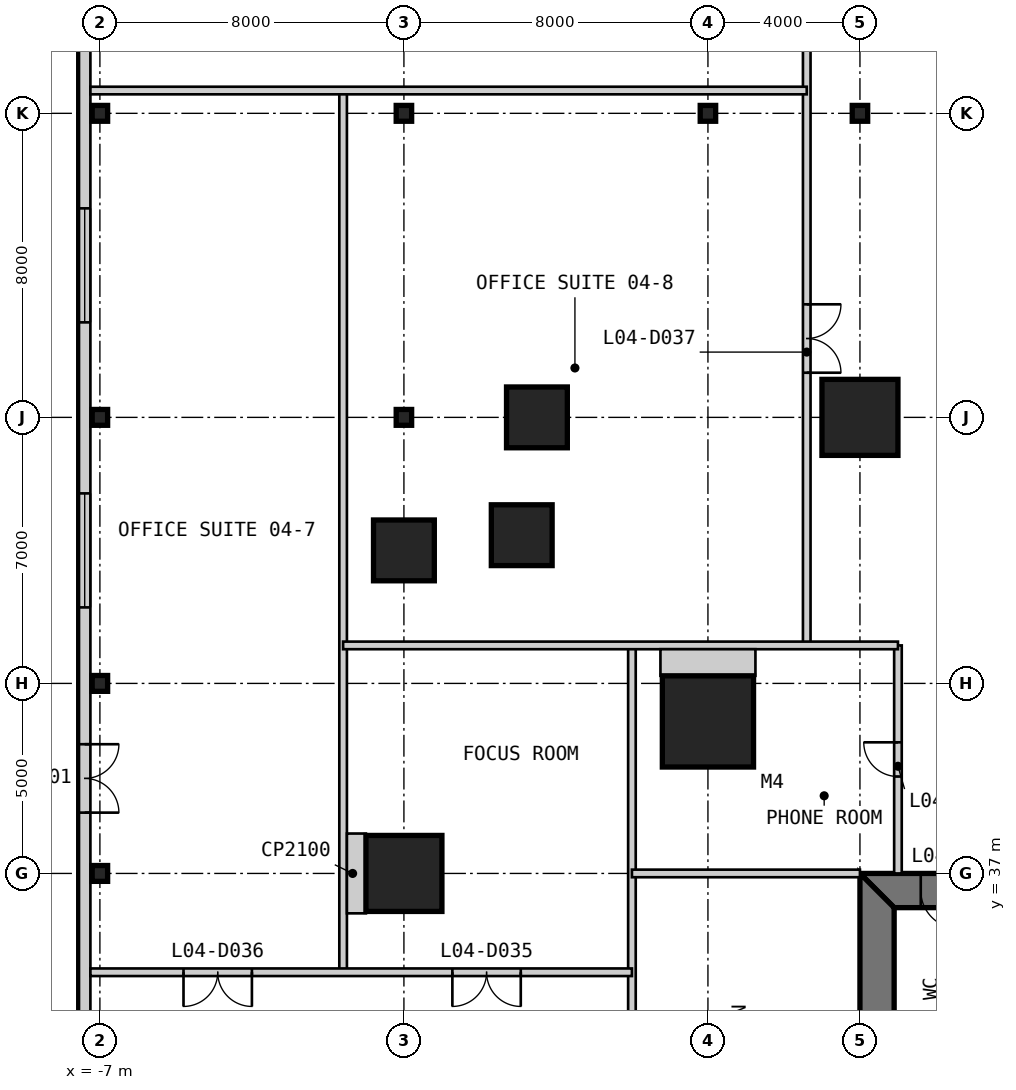
"""IFC4 building model, lengths in metres.
Left out: names, types, materials, properties, quantities, classifications, styles, units other than length and angle.
Written with IfcOpenShell. Run it as: python <this file> out.ifc"""

import sys

from ifc_helpers import new_model, si_unit, direction, frame, frame_2d, origin, origin_2d, place, context, subcontext, project, spatial, polyline, rectangle, i_section, outline, extrude, element, fill, save


model = new_model("IFC4")
c1 = context("Model", 3, precision=1e-05, world=origin(), true_north=direction((0.0, 1.0)))
c2 = subcontext(c1, "Body", "Model", "MODEL_VIEW")
j1 = project(units=[si_unit("LENGTHUNIT", "METRE"), si_unit("PLANEANGLEUNIT", "RADIAN")], contexts=[c1])
p1 = place(None, origin())
s1 = spatial("IfcSite", under=j1, at=p1, CompositionType="ELEMENT")
p2 = place(p1, origin())
s2 = spatial("IfcBuilding", under=s1, at=p2, CompositionType="ELEMENT")
p3 = place(p2, frame((0.0, 0.0, 21.4)))
s3 = spatial("IfcBuildingStorey", under=s2, at=p3, CompositionType="ELEMENT", Elevation=21.4)
p4 = place(p3, frame((9.0, 41.0, 0.0), z_axis=(0.0, 0.0, 1.0), x_axis=(1.0, 0.0, 0.0)))
e1 = element("IfcColumn", 1, at=p4, inside=s3, PredefinedType="COLUMN", context=c2, shape_type="SweptSolid", body=[
    extrude(rectangle(XDim=2.4, YDim=2.4, at=origin_2d()), origin(), (0.0, 0.0, 1.0), 4.8),
])
p5 = place(p3, frame((13.0, 49.0, 0.0), z_axis=(0.0, 0.0, 1.0), x_axis=(1.0, 0.0, 0.0)))
e2 = element("IfcColumn", 2, at=p5, inside=s3, PredefinedType="COLUMN", context=c2, shape_type="SweptSolid", body=[
    extrude(rectangle(XDim=2.0, YDim=2.0, at=origin_2d()), origin(), (0.0, 0.0, 1.0), 4.8),
])
for number, where, z_axis, x_axis in (
    (3, (4.5, 49.0, 0.0), (0.0, 0.0, 1.0), (1.0, 0.0, 0.0)),
    (4, (4.1, 45.9, 0.0), (0.0, 0.0, 1.0), (1.0, 0.0, 0.0)),
    (5, (1.0, 45.5, 0.0), (0.0, 0.0, 1.0), (1.0, 0.0, 0.0)),
):
    element("IfcColumn", number, at=place(p3, frame(where, z_axis=z_axis, x_axis=x_axis)), inside=s3, PredefinedType="COLUMN", context=c2, shape_type="SweptSolid", body=[
        extrude(rectangle(XDim=1.6, YDim=1.6, at=origin_2d()), origin(), (0.0, 0.0, 1.0), 4.8),
    ])
p6 = place(p3, frame((1.0, 37.0, 0.0), z_axis=(0.0, 0.0, 1.0), x_axis=(1.0, 0.0, 0.0)))
e6 = element("IfcColumn", 6, at=p6, inside=s3, PredefinedType="COLUMN", context=c2, shape_type="SweptSolid", body=[
    extrude(rectangle(XDim=2.0, YDim=2.0, at=origin_2d()), origin(), (0.0, 0.0, 1.0), 4.8),
])
for number, where, z_axis, x_axis in (
    (7, (-7.0, 37.0, 0.0), (0.0, 0.0, 1.0), (1.0, 0.0, 0.0)),
    (8, (-7.0, 42.0, 0.0), (0.0, 0.0, 1.0), (1.0, 0.0, 0.0)),
    (9, (-7.0, 49.0, 0.0), (0.0, 0.0, 1.0), (1.0, 0.0, 0.0)),
    (10, (-7.0, 57.0, 0.0), (0.0, 0.0, 1.0), (1.0, 0.0, 0.0)),
    (11, (1.0, 49.0, 0.0), (0.0, 0.0, 1.0), (1.0, 0.0, 0.0)),
    (12, (1.0, 57.0, 0.0), (0.0, 0.0, 1.0), (1.0, 0.0, 0.0)),
    (13, (9.0, 57.0, 0.0), (0.0, 0.0, 1.0), (1.0, 0.0, 0.0)),
    (14, (13.0, 57.0, 0.0), (0.0, 0.0, 1.0), (1.0, 0.0, 0.0)),
):
    element("IfcColumn", number, at=place(p3, frame(where, z_axis=z_axis, x_axis=x_axis)), inside=s3, PredefinedType="COLUMN", context=c2, shape_type="SweptSolid", body=[
        extrude(i_section(OverallWidth=0.406, OverallDepth=0.417, WebThickness=0.03, FlangeThickness=0.048, at=origin_2d()), origin(), (0.0, 0.0, 1.0), 4.8),
    ])
p7 = place(p3, frame((37.0, 36.55, 0.0), z_axis=(0.0, 0.0, 1.0), x_axis=(-1.0, 0.0, 0.0)))
e15 = element("IfcWall", 15, at=p7, inside=s3, PredefinedType="SHEAR", context=c2, shape_type="SweptSolid", body=[
    extrude(outline(polyline([(0.0, -0.45), (24.0, -0.45), (23.1, 0.45), (0.9, 0.45), (0.0, -0.45)])), origin(), (0.0, 0.0, 1.0), 4.8),
])
p8 = place(p7, frame((4.9, 0.0, 0.0)))
e16 = element("IfcOpeningElement", 16, at=p8, cuts=e15, PredefinedType="OPENING", context=c2, shape_type="SweptSolid", body=[
    extrude(rectangle(XDim=1.0, YDim=2.2, at=frame_2d((0.5, 1.1))), frame((0.0, 0.46, 0.0), z_axis=(0.0, -1.0, 0.0), x_axis=(1.0, 0.0, 0.0)), (0.0, 0.0, 1.0), 0.92),
])
p9 = place(p7, frame((8.9, 0.0, 0.0)))
e17 = element("IfcOpeningElement", 17, at=p9, cuts=e15, PredefinedType="OPENING", context=c2, shape_type="SweptSolid", body=[
    extrude(rectangle(XDim=1.1, YDim=2.2, at=frame_2d((0.55, 1.1))), frame((0.0, 0.46, 0.0), z_axis=(0.0, -1.0, 0.0), x_axis=(1.0, 0.0, 0.0)), (0.0, 0.0, 1.0), 0.92),
])
p10 = place(p7, frame((15.05, 0.0, 0.0)))
e18 = element("IfcOpeningElement", 18, at=p10, cuts=e15, PredefinedType="OPENING", context=c2, shape_type="SweptSolid", body=[
    extrude(rectangle(XDim=0.9, YDim=2.2, at=frame_2d((0.45, 1.1))), frame((0.0, 0.46, 0.0), z_axis=(0.0, -1.0, 0.0), x_axis=(1.0, 0.0, 0.0)), (0.0, 0.0, 1.0), 0.92),
])
p11 = place(p7, frame((17.9, 0.0, 0.0)))
e19 = element("IfcOpeningElement", 19, at=p11, cuts=e15, PredefinedType="OPENING", context=c2, shape_type="SweptSolid", body=[
    extrude(rectangle(XDim=1.0, YDim=2.2, at=frame_2d((0.5, 1.1))), frame((0.0, 0.46, 0.0), z_axis=(0.0, -1.0, 0.0), x_axis=(1.0, 0.0, 0.0)), (0.0, 0.0, 1.0), 0.92),
])
p12 = place(p7, frame((21.4, 0.0, 0.0)))
e20 = element("IfcOpeningElement", 20, at=p12, cuts=e15, PredefinedType="OPENING", context=c2, shape_type="SweptSolid", body=[
    extrude(rectangle(XDim=1.0, YDim=2.2, at=frame_2d((0.5, 1.1))), frame((0.0, 0.46, 0.0), z_axis=(0.0, -1.0, 0.0), x_axis=(1.0, 0.0, 0.0)), (0.0, 0.0, 1.0), 0.92),
])
p13 = place(p3, frame((13.45, 36.1, 0.0), z_axis=(0.0, 0.0, 1.0), x_axis=(0.0, -1.0, 0.0)))
e21 = element("IfcWall", 21, at=p13, inside=s3, PredefinedType="SHEAR", context=c2, shape_type="SweptSolid", body=[
    extrude(outline(polyline([(-0.9, -0.45), (23.1, -0.45), (22.2, 0.45), (0.0, 0.45), (-0.9, -0.45)])), origin(), (0.0, 0.0, 1.0), 4.8),
])
p14 = place(p13, frame((20.2, 0.0, 0.0)))
e22 = element("IfcOpeningElement", 22, at=p14, cuts=e21, PredefinedType="OPENING", context=c2, shape_type="SweptSolid", body=[
    extrude(rectangle(XDim=1.0, YDim=2.2, at=frame_2d((0.5, 1.1))), frame((0.0, 0.46, 0.0), z_axis=(0.0, -1.0, 0.0), x_axis=(1.0, 0.0, 0.0)), (0.0, 0.0, 1.0), 0.92),
])
p15 = place(p13, frame((17.25, 0.0, 0.0)))
e23 = element("IfcOpeningElement", 23, at=p15, cuts=e21, PredefinedType="OPENING", context=c2, shape_type="SweptSolid", body=[
    extrude(rectangle(XDim=0.9, YDim=2.2, at=frame_2d((0.45, 1.1))), frame((0.0, 0.46, 0.0), z_axis=(0.0, -1.0, 0.0), x_axis=(1.0, 0.0, 0.0)), (0.0, 0.0, 1.0), 0.92),
])
p16 = place(p3, frame((-7.4, 65.25, 0.0), z_axis=(0.0, 0.0, 1.0), x_axis=(0.0, -1.0, 0.0)))
e24 = element("IfcWall", 24, at=p16, inside=s3, PredefinedType="SOLIDWALL", context=c2, shape_type="SweptSolid", body=[
    extrude(rectangle(XDim=72.5, YDim=0.3, at=frame_2d((36.25, 0.0))), origin(), (0.0, 0.0, 1.0), 4.5),
])
p17 = place(p16, frame((24.85, 0.0, 0.0)))
e25 = element("IfcOpeningElement", 25, at=p17, cuts=e24, PredefinedType="OPENING", context=c2, shape_type="SweptSolid", body=[
    extrude(rectangle(XDim=1.8, YDim=2.4, at=frame_2d((0.9, 1.2))), frame((0.0, 0.16, 0.0), z_axis=(0.0, -1.0, 0.0), x_axis=(1.0, 0.0, 0.0)), (0.0, 0.0, 1.0), 0.32),
])
p18 = place(p16, frame((59.85, 0.0, 0.0)))
e26 = element("IfcOpeningElement", 26, at=p18, cuts=e24, PredefinedType="OPENING", context=c2, shape_type="SweptSolid", body=[
    extrude(rectangle(XDim=1.8, YDim=2.4, at=frame_2d((0.9, 1.2))), frame((0.0, 0.16, 0.0), z_axis=(0.0, -1.0, 0.0), x_axis=(1.0, 0.0, 0.0)), (0.0, 0.0, 1.0), 0.32),
])
p19 = place(p16, frame((66.75, 0.0, 0.9)))
e27 = element("IfcOpeningElement", 27, at=p19, cuts=e24, PredefinedType="OPENING", context=c2, shape_type="SweptSolid", body=[
    extrude(rectangle(XDim=3.0, YDim=2.4, at=frame_2d((1.5, 1.2))), frame((0.0, 0.16, 0.0), z_axis=(0.0, -1.0, 0.0), x_axis=(1.0, 0.0, 0.0)), (0.0, 0.0, 1.0), 0.32),
])
p20 = place(p16, frame((44.75, 0.0, 0.9)))
e28 = element("IfcOpeningElement", 28, at=p20, cuts=e24, PredefinedType="OPENING", context=c2, shape_type="SweptSolid", body=[
    extrude(rectangle(XDim=3.0, YDim=2.4, at=frame_2d((1.5, 1.2))), frame((0.0, 0.16, 0.0), z_axis=(0.0, -1.0, 0.0), x_axis=(1.0, 0.0, 0.0)), (0.0, 0.0, 1.0), 0.32),
])
p21 = place(p16, frame((32.75, 0.0, 0.9)))
e29 = element("IfcOpeningElement", 29, at=p21, cuts=e24, PredefinedType="OPENING", context=c2, shape_type="SweptSolid", body=[
    extrude(rectangle(XDim=3.0, YDim=2.4, at=frame_2d((1.5, 1.2))), frame((0.0, 0.16, 0.0), z_axis=(0.0, -1.0, 0.0), x_axis=(1.0, 0.0, 0.0)), (0.0, 0.0, 1.0), 0.32),
])
p22 = place(p16, frame((18.25, 0.0, 0.9)))
e30 = element("IfcOpeningElement", 30, at=p22, cuts=e24, PredefinedType="OPENING", context=c2, shape_type="SweptSolid", body=[
    extrude(rectangle(XDim=3.0, YDim=2.4, at=frame_2d((1.5, 1.2))), frame((0.0, 0.16, 0.0), z_axis=(0.0, -1.0, 0.0), x_axis=(1.0, 0.0, 0.0)), (0.0, 0.0, 1.0), 0.32),
])
p23 = place(p16, frame((10.75, 0.0, 0.9)))
e31 = element("IfcOpeningElement", 31, at=p23, cuts=e24, PredefinedType="OPENING", context=c2, shape_type="SweptSolid", body=[
    extrude(rectangle(XDim=3.0, YDim=2.4, at=frame_2d((1.5, 1.2))), frame((0.0, 0.16, 0.0), z_axis=(0.0, -1.0, 0.0), x_axis=(1.0, 0.0, 0.0)), (0.0, 0.0, 1.0), 0.32),
])
p24 = place(p16, frame((2.75, 0.0, 0.9)))
e32 = element("IfcOpeningElement", 32, at=p24, cuts=e24, PredefinedType="OPENING", context=c2, shape_type="SweptSolid", body=[
    extrude(rectangle(XDim=3.0, YDim=2.4, at=frame_2d((1.5, 1.2))), frame((0.0, 0.16, 0.0), z_axis=(0.0, -1.0, 0.0), x_axis=(1.0, 0.0, 0.0)), (0.0, 0.0, 1.0), 0.32),
])
p25 = place(p3, frame((-0.6, 34.4, 0.0), z_axis=(0.0, 0.0, 1.0), x_axis=(0.0, 1.0, 0.0)))
e33 = element("IfcWall", 33, at=p25, inside=s3, PredefinedType="PARTITIONING", context=c2, shape_type="SweptSolid", body=[
    extrude(rectangle(XDim=23.2, YDim=0.2, at=frame_2d((11.6, 0.0))), origin(), (0.0, 0.0, 1.0), 4.5),
])
p26 = place(p3, frame((7.0, 15.0, 0.0), z_axis=(0.0, 0.0, 1.0), x_axis=(0.0, 1.0, 0.0)))
e34 = element("IfcWall", 34, at=p26, inside=s3, PredefinedType="PARTITIONING", context=c2, shape_type="SweptSolid", body=[
    extrude(rectangle(XDim=28.0, YDim=0.2, at=frame_2d((14.0, 0.0))), origin(), (0.0, 0.0, 1.0), 3.843),
])
p27 = place(p3, frame((11.6, 43.0, 0.0), z_axis=(0.0, 0.0, 1.0), x_axis=(0.0, 1.0, 0.0)))
e35 = element("IfcWall", 35, at=p27, inside=s3, PredefinedType="PARTITIONING", context=c2, shape_type="SweptSolid", body=[
    extrude(rectangle(XDim=22.25, YDim=0.2, at=frame_2d((11.125, 0.0))), origin(), (0.0, 0.0, 1.0), 4.5),
])
p28 = place(p27, frame((7.175, 0.0, 0.0)))
e36 = element("IfcOpeningElement", 36, at=p28, cuts=e35, PredefinedType="OPENING", context=c2, shape_type="SweptSolid", body=[
    extrude(rectangle(XDim=1.8, YDim=2.4, at=frame_2d((0.9, 1.2))), frame((0.0, 0.11, 0.0), z_axis=(0.0, -1.0, 0.0), x_axis=(1.0, 0.0, 0.0)), (0.0, 0.0, 1.0), 0.22),
])
p29 = place(p27, frame((17.5, 0.0, 0.0)))
e37 = element("IfcOpeningElement", 37, at=p29, cuts=e35, PredefinedType="OPENING", context=c2, shape_type="SweptSolid", body=[
    extrude(rectangle(XDim=1.8, YDim=2.4, at=frame_2d((0.9, 1.2))), frame((0.0, 0.11, 0.0), z_axis=(0.0, -1.0, 0.0), x_axis=(1.0, 0.0, 0.0)), (0.0, 0.0, 1.0), 0.22),
])
p30 = place(p3, frame((14.0, 37.0, 0.0), z_axis=(0.0, 0.0, 1.0), x_axis=(0.0, 1.0, 0.0)))
e38 = element("IfcWall", 38, at=p30, inside=s3, PredefinedType="PARTITIONING", context=c2, shape_type="SweptSolid", body=[
    extrude(rectangle(XDim=6.0, YDim=0.2, at=frame_2d((3.0, 0.0))), origin(), (0.0, 0.0, 1.0), 4.5),
])
p31 = place(p30, frame((2.55, 0.0, 0.0)))
e39 = element("IfcOpeningElement", 39, at=p31, cuts=e38, PredefinedType="OPENING", context=c2, shape_type="SweptSolid", body=[
    extrude(rectangle(XDim=0.9, YDim=2.2, at=frame_2d((0.45, 1.1))), frame((0.0, 0.11, 0.0), z_axis=(0.0, -1.0, 0.0), x_axis=(1.0, 0.0, 0.0)), (0.0, 0.0, 1.0), 0.22),
])
p32 = place(p3, frame((-7.25, 34.4, 0.0), z_axis=(0.0, 0.0, 1.0), x_axis=(1.0, 0.0, 0.0)))
e40 = element("IfcWall", 40, at=p32, inside=s3, PredefinedType="PARTITIONING", context=c2, shape_type="SweptSolid", body=[
    extrude(rectangle(XDim=14.25, YDim=0.2, at=frame_2d((7.125, 0.0))), origin(), (0.0, 0.0, 1.0), 4.5),
])
p33 = place(p32, frame((9.525, 0.0, 0.0)))
e41 = element("IfcOpeningElement", 41, at=p33, cuts=e40, PredefinedType="OPENING", context=c2, shape_type="SweptSolid", body=[
    extrude(rectangle(XDim=1.8, YDim=2.4, at=frame_2d((0.9, 1.2))), frame((0.0, 0.11, 0.0), z_axis=(0.0, -1.0, 0.0), x_axis=(1.0, 0.0, 0.0)), (0.0, 0.0, 1.0), 0.22),
])
p34 = place(p32, frame((2.45, 0.0, 0.0)))
e42 = element("IfcOpeningElement", 42, at=p34, cuts=e40, PredefinedType="OPENING", context=c2, shape_type="SweptSolid", body=[
    extrude(rectangle(XDim=1.8, YDim=2.4, at=frame_2d((0.9, 1.2))), frame((0.0, 0.11, 0.0), z_axis=(0.0, -1.0, 0.0), x_axis=(1.0, 0.0, 0.0)), (0.0, 0.0, 1.0), 0.22),
])
p35 = place(p3, frame((7.0, 37.0, 0.0), z_axis=(0.0, 0.0, 1.0), x_axis=(1.0, 0.0, 0.0)))
e43 = element("IfcWall", 43, at=p35, inside=s3, PredefinedType="PARTITIONING", context=c2, shape_type="SweptSolid", body=[
    extrude(rectangle(XDim=6.0, YDim=0.2, at=frame_2d((3.0, 0.0))), origin(), (0.0, 0.0, 1.0), 3.653),
])
p36 = place(p3, frame((-0.6, 43.0, 0.0), z_axis=(0.0, 0.0, 1.0), x_axis=(1.0, 0.0, 0.0)))
e44 = element("IfcWall", 44, at=p36, inside=s3, PredefinedType="PARTITIONING", context=c2, shape_type="SweptSolid", body=[
    extrude(rectangle(XDim=14.6, YDim=0.2, at=frame_2d((7.3, 0.0))), origin(), (0.0, 0.0, 1.0), 4.5),
])
p37 = place(p3, frame((-7.25, 57.6, 0.0), z_axis=(0.0, 0.0, 1.0), x_axis=(1.0, 0.0, 0.0)))
e45 = element("IfcWall", 45, at=p37, inside=s3, PredefinedType="PARTITIONING", context=c2, shape_type="SweptSolid", body=[
    extrude(rectangle(XDim=18.85, YDim=0.2, at=frame_2d((9.425, 0.0))), origin(), (0.0, 0.0, 1.0), 4.5),
])
p38 = place(p3, frame((-0.5, 37.0, 0.0), z_axis=(0.0, 0.0, 1.0), x_axis=(1.0, 0.0, 0.0)))
e46 = element("IfcWall", 46, at=p38, inside=s3, PredefinedType="PARTITIONING", context=c2, shape_type="SweptSolid", body=[
    extrude(rectangle(XDim=0.5, YDim=2.1, at=frame_2d((0.25, 0.0))), origin(), (0.0, 0.0, 1.0), 4.5),
])
p39 = place(p3, frame((9.0, 42.9, 0.0), z_axis=(0.0, 0.0, 1.0), x_axis=(0.0, -1.0, 0.0)))
e47 = element("IfcWall", 47, at=p39, inside=s3, PredefinedType="PARTITIONING", context=c2, shape_type="SweptSolid", body=[
    extrude(rectangle(XDim=0.7, YDim=2.5, at=frame_2d((0.35, 0.0))), origin(), (0.0, 0.0, 1.0), 4.5),
])
p40 = place(p17, origin())
e48 = element("IfcDoor", 48, at=p40, inside=s3, OperationType="DOUBLE_DOOR_SINGLE_SWING", PredefinedType="DOOR", context=c2, shape_type="SweptSolid", body=[
    extrude(rectangle(XDim=1.8, YDim=2.4, at=frame_2d((0.9, 1.2))), frame((0.0, 0.025, 0.0), z_axis=(0.0, -1.0, 0.0), x_axis=(1.0, 0.0, 0.0)), (0.0, 0.0, 1.0), 0.05),
])
fill(e25, e48)
p41 = place(p22, origin())
e49 = element("IfcWindow", 49, at=p41, inside=s3, PartitioningType="SINGLE_PANEL", PredefinedType="WINDOW", context=c2, shape_type="SweptSolid", body=[
    extrude(rectangle(XDim=3.0, YDim=2.4, at=frame_2d((1.5, 1.2))), frame((0.0, 0.03, 0.0), z_axis=(0.0, -1.0, 0.0), x_axis=(1.0, 0.0, 0.0)), (0.0, 0.0, 1.0), 0.06),
])
fill(e30, e49)
p42 = place(p23, origin())
e50 = element("IfcWindow", 50, at=p42, inside=s3, PartitioningType="SINGLE_PANEL", PredefinedType="WINDOW", context=c2, shape_type="SweptSolid", body=[
    extrude(rectangle(XDim=3.0, YDim=2.4, at=frame_2d((1.5, 1.2))), frame((0.0, 0.03, 0.0), z_axis=(0.0, -1.0, 0.0), x_axis=(1.0, 0.0, 0.0)), (0.0, 0.0, 1.0), 0.06),
])
fill(e31, e50)
p43 = place(p12, origin())
e51 = element("IfcDoor", 51, at=p43, inside=s3, OperationType="SINGLE_SWING_LEFT", PredefinedType="DOOR", context=c2, shape_type="SweptSolid", body=[
    extrude(rectangle(XDim=1.0, YDim=2.2, at=frame_2d((0.5, 1.1))), frame((0.0, 0.025, 0.0), z_axis=(0.0, -1.0, 0.0), x_axis=(1.0, 0.0, 0.0)), (0.0, 0.0, 1.0), 0.05),
    extrude(outline(polyline([(0.0, 0.0), (0.04, 0.0), (0.04, 2.16), (0.96, 2.16), (0.96, 0.0), (1.0, 0.0), (1.0, 2.2), (0.0, 2.2), (0.0, 0.0)])), frame((0.0, 0.3, 0.0), z_axis=(0.0, -1.0, 0.0), x_axis=(1.0, 0.0, 0.0)), (0.0, 0.0, 1.0), 0.6),
])
fill(e20, e51)
p44 = place(p33, frame((1.8, 0.0, 0.0), z_axis=(0.0, 0.0, 1.0), x_axis=(-1.0, 0.0, 0.0)))
e52 = element("IfcDoor", 52, at=p44, inside=s3, OperationType="DOUBLE_DOOR_SINGLE_SWING", PredefinedType="DOOR", context=c2, shape_type="SweptSolid", body=[
    extrude(rectangle(XDim=1.8, YDim=2.4, at=frame_2d((0.9, 1.2))), frame((0.0, 0.025, 0.0), z_axis=(0.0, -1.0, 0.0), x_axis=(1.0, 0.0, 0.0)), (0.0, 0.0, 1.0), 0.05),
])
fill(e41, e52)
p45 = place(p34, frame((1.8, 0.0, 0.0), z_axis=(0.0, 0.0, 1.0), x_axis=(-1.0, 0.0, 0.0)))
e53 = element("IfcDoor", 53, at=p45, inside=s3, OperationType="DOUBLE_DOOR_SINGLE_SWING", PredefinedType="DOOR", context=c2, shape_type="SweptSolid", body=[
    extrude(rectangle(XDim=1.8, YDim=2.4, at=frame_2d((0.9, 1.2))), frame((0.0, 0.025, 0.0), z_axis=(0.0, -1.0, 0.0), x_axis=(1.0, 0.0, 0.0)), (0.0, 0.0, 1.0), 0.05),
])
fill(e42, e53)
p46 = place(p28, frame((1.8, 0.0, 0.0), z_axis=(0.0, 0.0, 1.0), x_axis=(-1.0, 0.0, 0.0)))
e54 = element("IfcDoor", 54, at=p46, inside=s3, OperationType="DOUBLE_DOOR_SINGLE_SWING", PredefinedType="DOOR", context=c2, shape_type="SweptSolid", body=[
    extrude(rectangle(XDim=1.8, YDim=2.4, at=frame_2d((0.9, 1.2))), frame((0.0, 0.025, 0.0), z_axis=(0.0, -1.0, 0.0), x_axis=(1.0, 0.0, 0.0)), (0.0, 0.0, 1.0), 0.05),
])
fill(e36, e54)
p47 = place(p31, origin())
e55 = element("IfcDoor", 55, at=p47, inside=s3, OperationType="SINGLE_SWING_RIGHT", PredefinedType="DOOR", context=c2, shape_type="SweptSolid", body=[
    extrude(rectangle(XDim=0.9, YDim=2.2, at=frame_2d((0.45, 1.1))), frame((0.0, 0.025, 0.0), z_axis=(0.0, -1.0, 0.0), x_axis=(1.0, 0.0, 0.0)), (0.0, 0.0, 1.0), 0.05),
])
fill(e39, e55)
save(model, sys.argv[1])
